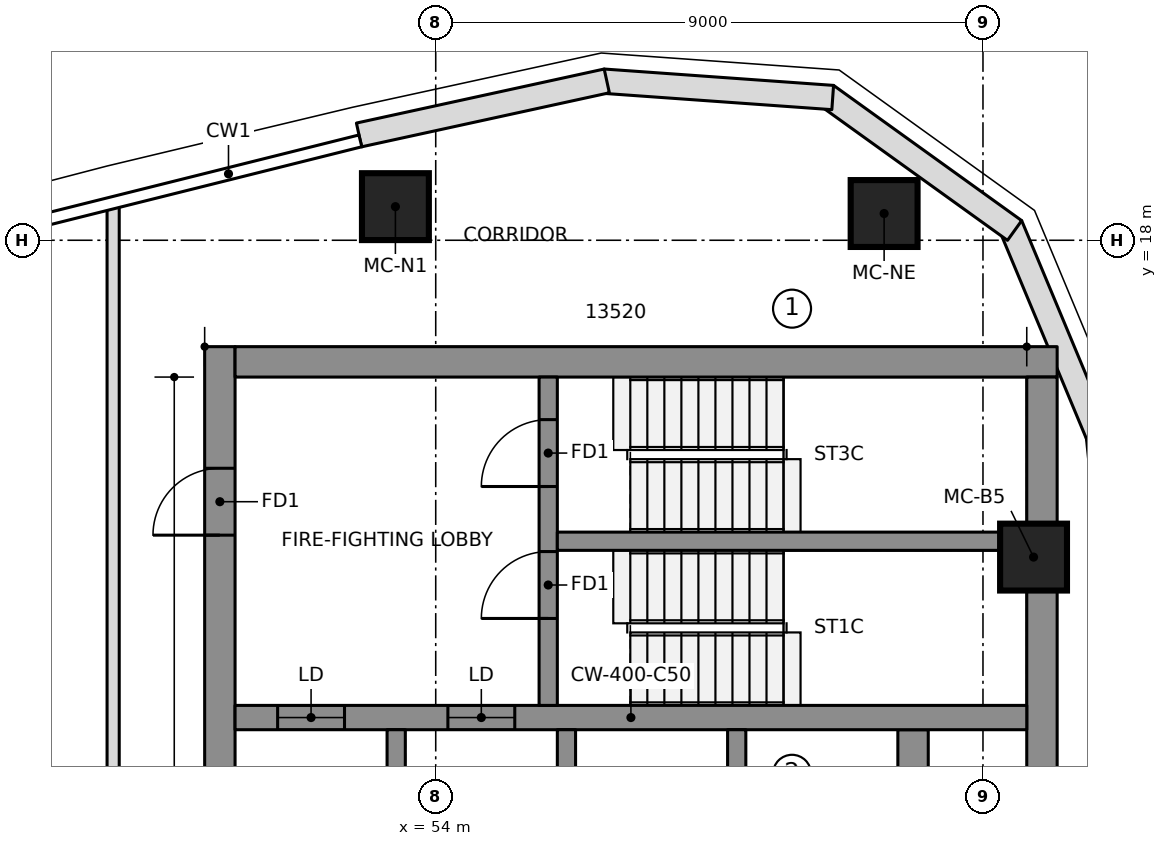
"""IFC4 building model, lengths in metres.
Left out: names, types, materials, properties, quantities, classifications, styles, units other than length and angle.
Written with IfcOpenShell. Run it as: python <this file> out.ifc"""

import sys

from ifc_helpers import new_model, si_unit, direction, frame, frame_2d, origin, origin_2d, place, context, subcontext, project, spatial, polyline, rectangle, outline, extrude, element, fill, save


model = new_model("IFC4")
c1 = context("Model", 3, precision=1e-05, world=origin(), true_north=direction((0.0, 1.0)))
c2 = subcontext(c1, "Body", "Model", "MODEL_VIEW")
j1 = project(units=[si_unit("LENGTHUNIT", "METRE"), si_unit("PLANEANGLEUNIT", "RADIAN")], contexts=[c1])
p1 = place(None, origin())
s1 = spatial("IfcSite", under=j1, at=p1, CompositionType="ELEMENT")
p2 = place(p1, origin())
s2 = spatial("IfcBuilding", under=s1, at=p2, CompositionType="ELEMENT")
p3 = place(p2, frame((0.0, 0.0, 299.85)))
s3 = spatial("IfcBuildingStorey", under=s2, at=p3, CompositionType="ELEMENT", Elevation=299.85)
p4 = place(p3, frame((50.45, 6.65, 0.0), z_axis=(0.0, 0.0, 1.0), x_axis=(0.0, 1.0, 0.0)))
e1 = element("IfcWall", 1, at=p4, inside=s3, PredefinedType="SHEAR", context=c2, shape_type="SweptSolid", body=[
    extrude(rectangle(XDim=9.6, YDim=0.5, at=frame_2d((4.8, 0.0))), origin(), (0.0, 0.0, 1.0), 3.55),
])
p5 = place(p4, frame((6.5, 0.0, 0.0)))
e2 = element("IfcOpeningElement", 2, at=p5, cuts=e1, PredefinedType="OPENING", context=c2, shape_type="SweptSolid", body=[
    extrude(rectangle(XDim=1.1, YDim=2.1, at=frame_2d((0.55, 1.05))), frame((0.0, 0.26, 0.0), z_axis=(0.0, -1.0, 0.0), x_axis=(1.0, 0.0, 0.0)), (0.0, 0.0, 1.0), 0.52),
])
p6 = place(p3, frame((50.7, 16.0, 0.0), z_axis=(0.0, 0.0, 1.0), x_axis=(1.0, 0.0, 0.0)))
e3 = element("IfcWall", 3, at=p6, inside=s3, PredefinedType="SHEAR", context=c2, shape_type="SweptSolid", body=[
    extrude(rectangle(XDim=13.52, YDim=0.5, at=frame_2d((6.76, 0.0))), origin(), (0.0, 0.0, 1.0), 3.55),
])
p7 = place(p3, frame((63.97, 6.903, 0.0), z_axis=(0.0, 0.0, 1.0), x_axis=(0.0, 1.0, 0.0)))
e4 = element("IfcWall", 4, at=p7, inside=s3, PredefinedType="SHEAR", context=c2, shape_type="SweptSolid", body=[
    extrude(rectangle(XDim=8.847, YDim=0.5, at=frame_2d((4.423, 0.0))), origin(), (0.0, 0.0, 1.0), 3.55),
])
p8 = place(p3, frame((61.85, -9.95, 0.0), z_axis=(0.0, 0.0, 1.0), x_axis=(0.0, 1.0, 0.0)))
e5 = element("IfcWall", 5, at=p8, inside=s3, PredefinedType="SHEAR", context=c2, shape_type="SweptSolid", body=[
    extrude(rectangle(XDim=19.9, YDim=0.5, at=frame_2d((9.95, 0.0))), origin(), (0.0, 0.0, 1.0), 3.55),
])
p9 = place(p3, frame((50.7, 10.15, 0.0), z_axis=(0.0, 0.0, 1.0), x_axis=(1.0, 0.0, 0.0)))
e6 = element("IfcWall", 6, at=p9, inside=s3, PredefinedType="SHEAR", context=c2, shape_type="SweptSolid", body=[
    extrude(rectangle(XDim=13.02, YDim=0.4, at=frame_2d((6.51, 0.0))), origin(), (0.0, 0.0, 1.0), 3.55),
])
p10 = place(p9, frame((0.7, 0.0, 0.0)))
e7 = element("IfcOpeningElement", 7, at=p10, cuts=e6, PredefinedType="OPENING", context=c2, shape_type="SweptSolid", body=[
    extrude(rectangle(XDim=1.1, YDim=2.1, at=frame_2d((0.55, 1.05))), frame((0.0, 0.21, 0.0), z_axis=(0.0, -1.0, 0.0), x_axis=(1.0, 0.0, 0.0)), (0.0, 0.0, 1.0), 0.42),
])
p11 = place(p9, frame((3.5, 0.0, 0.0)))
e8 = element("IfcOpeningElement", 8, at=p11, cuts=e6, PredefinedType="OPENING", context=c2, shape_type="SweptSolid", body=[
    extrude(rectangle(XDim=1.1, YDim=2.1, at=frame_2d((0.55, 1.05))), frame((0.0, 0.21, 0.0), z_axis=(0.0, -1.0, 0.0), x_axis=(1.0, 0.0, 0.0)), (0.0, 0.0, 1.0), 0.42),
])
for number, where, z_axis, x_axis in (
    (9, (53.35, 6.95, 0.0), (0.0, 0.0, 1.0), (0.0, 1.0, 0.0)),
    (10, (56.15, 6.95, 0.0), (0.0, 0.0, 1.0), (0.0, 1.0, 0.0)),
    (11, (58.95, 6.95, 0.0), (0.0, 0.0, 1.0), (0.0, 1.0, 0.0)),
):
    element("IfcWall", number, at=place(p3, frame(where, z_axis=z_axis, x_axis=x_axis)), inside=s3, PredefinedType="SHEAR", context=c2, shape_type="SweptSolid", body=[
        extrude(rectangle(XDim=3.0, YDim=0.3, at=frame_2d((1.5, 0.0))), origin(), (0.0, 0.0, 1.0), 3.55),
    ])
p12 = place(p3, frame((55.85, 10.35, 0.0), z_axis=(0.0, 0.0, 1.0), x_axis=(0.0, 1.0, 0.0)))
e12 = element("IfcWall", 12, at=p12, inside=s3, PredefinedType="SHEAR", context=c2, shape_type="SweptSolid", body=[
    extrude(rectangle(XDim=5.4, YDim=0.3, at=frame_2d((2.7, 0.0))), origin(), (0.0, 0.0, 1.0), 3.55),
])
p13 = place(p12, frame((1.43, 0.0, 0.0)))
e13 = element("IfcOpeningElement", 13, at=p13, cuts=e12, PredefinedType="OPENING", context=c2, shape_type="SweptSolid", body=[
    extrude(rectangle(XDim=1.1, YDim=2.1, at=frame_2d((0.55, 1.05))), frame((0.0, 0.16, 0.0), z_axis=(0.0, -1.0, 0.0), x_axis=(1.0, 0.0, 0.0)), (0.0, 0.0, 1.0), 0.32),
])
p14 = place(p12, frame((3.6, 0.0, 0.0)))
e14 = element("IfcOpeningElement", 14, at=p14, cuts=e12, PredefinedType="OPENING", context=c2, shape_type="SweptSolid", body=[
    extrude(rectangle(XDim=1.1, YDim=2.1, at=frame_2d((0.55, 1.05))), frame((0.0, 0.16, 0.0), z_axis=(0.0, -1.0, 0.0), x_axis=(1.0, 0.0, 0.0)), (0.0, 0.0, 1.0), 0.32),
])
p15 = place(p3, frame((56.0, 13.05, 0.0), z_axis=(0.0, 0.0, 1.0), x_axis=(1.0, 0.0, 0.0)))
e15 = element("IfcWall", 15, at=p15, inside=s3, PredefinedType="SHEAR", context=c2, shape_type="SweptSolid", body=[
    extrude(rectangle(XDim=7.72, YDim=0.3, at=frame_2d((3.86, 0.0))), origin(), (0.0, 0.0, 1.0), 3.55),
])
for number, where, z_axis, x_axis in (
    (16, (63.832, 12.789, 0.0), (0.0, 0.0, 1.0), (1.0, 0.0, 0.0)),
    (17, (61.374, 18.44, 0.0), (0.0, 0.0, 1.0), (1.0, 0.0, 0.0)),
    (18, (53.337, 18.553, 0.0), (0.0, 0.0, 1.0), (1.0, 0.0, 0.0)),
):
    element("IfcColumn", number, at=place(p3, frame(where, z_axis=z_axis, x_axis=x_axis)), inside=s3, PredefinedType="COLUMN", context=c2, shape_type="SweptSolid", body=[
        extrude(rectangle(XDim=1.1, YDim=1.1, at=origin_2d()), origin(), (0.0, 0.0, 1.0), 3.55),
    ])
p16 = place(p3, frame((65.331, 10.571, 0.0), z_axis=(0.0, 0.0, 1.0), x_axis=(-0.102249826987, 0.994758751096, 0.0)))
e19 = element("IfcWall", 19, at=p16, inside=s3, PredefinedType="NOTDEFINED", context=c2, shape_type="SweptSolid", body=[
    extrude(outline(polyline([(-0.003, -0.2), (4.263, -0.2), (4.204, 0.2), (0.003, 0.2), (-0.003, -0.2)])), origin(), (0.0, 0.0, 1.0), 3.25),
])
p17 = place(p3, frame((64.898, 14.782, 0.0), z_axis=(0.0, 0.0, 1.0), x_axis=(-0.385285857918, 0.922797273343, 0.0)))
e20 = element("IfcWall", 20, at=p17, inside=s3, PredefinedType="NOTDEFINED", context=c2, shape_type="SweptSolid", body=[
    extrude(outline(polyline([(-0.03, -0.2), (3.753, -0.2), (3.64, 0.2), (0.03, 0.2), (-0.03, -0.2)])), origin(), (0.0, 0.0, 1.0), 3.25),
])
p18 = place(p3, frame((63.474, 18.194, 0.0), z_axis=(0.0, 0.0, 1.0), x_axis=(-0.811962548682, 0.583709533533, 0.0)))
e21 = element("IfcWall", 21, at=p18, inside=s3, PredefinedType="NOTDEFINED", context=c2, shape_type="SweptSolid", body=[
    extrude(outline(polyline([(-0.057, -0.2), (3.753, -0.2), (3.64, 0.2), (0.057, 0.2), (-0.057, -0.2)])), origin(), (0.0, 0.0, 1.0), 3.25),
])
p19 = place(p3, frame((60.472, 20.352, 0.0), z_axis=(0.0, 0.0, 1.0), x_axis=(-0.99746272096, 0.071190731806, 0.0)))
e22 = element("IfcWall", 22, at=p19, inside=s3, PredefinedType="NOTDEFINED", context=c2, shape_type="SweptSolid", body=[
    extrude(outline(polyline([(-0.057, -0.2), (3.726, -0.2), (3.668, 0.2), (0.057, 0.2), (-0.057, -0.2)])), origin(), (0.0, 0.0, 1.0), 3.25),
])
p20 = place(p3, frame((56.785, 20.615, 0.0), z_axis=(0.0, 0.0, 1.0), x_axis=(-0.977020225348, -0.213146614471, 0.0)))
e23 = element("IfcWall", 23, at=p20, inside=s3, PredefinedType="NOTDEFINED", context=c2, shape_type="SweptSolid", body=[
    extrude(outline(polyline([(-0.029, -0.2), (4.142, -0.2), (4.142, 0.2), (0.029, 0.2), (-0.029, -0.2)])), origin(), (0.0, 0.0, 1.0), 3.25),
])
p21 = place(p3, frame((48.695, 18.553, 0.0), z_axis=(0.0, 0.0, 1.0), x_axis=(0.0, -1.0, 0.0)))
e24 = element("IfcWall", 24, at=p21, inside=s3, PredefinedType="PARTITIONING", context=c2, shape_type="SweptSolid", body=[
    extrude(rectangle(XDim=9.997, YDim=0.2, at=frame_2d((4.998, 0.0))), origin(), (0.0, 0.0, 1.0), 3.15),
])
p22 = place(p10, origin())
e25 = element("IfcDoor", 25, at=p22, inside=s3, OperationType="DOUBLE_DOOR_SLIDING", PredefinedType="DOOR", context=c2, shape_type="SweptSolid", body=[
    extrude(rectangle(XDim=1.1, YDim=2.1, at=frame_2d((0.55, 1.05))), frame((0.0, 0.025, 0.0), z_axis=(0.0, -1.0, 0.0), x_axis=(1.0, 0.0, 0.0)), (0.0, 0.0, 1.0), 0.05),
])
fill(e7, e25)
p23 = place(p11, origin())
e26 = element("IfcDoor", 26, at=p23, inside=s3, OperationType="DOUBLE_DOOR_SLIDING", PredefinedType="DOOR", context=c2, shape_type="SweptSolid", body=[
    extrude(rectangle(XDim=1.1, YDim=2.1, at=frame_2d((0.55, 1.05))), frame((0.0, 0.025, 0.0), z_axis=(0.0, -1.0, 0.0), x_axis=(1.0, 0.0, 0.0)), (0.0, 0.0, 1.0), 0.05),
])
fill(e8, e26)
p24 = place(p13, origin())
e27 = element("IfcDoor", 27, at=p24, inside=s3, OperationType="SINGLE_SWING_RIGHT", PredefinedType="DOOR", context=c2, shape_type="SweptSolid", body=[
    extrude(rectangle(XDim=1.1, YDim=2.1, at=frame_2d((0.55, 1.05))), frame((0.0, 0.025, 0.0), z_axis=(0.0, -1.0, 0.0), x_axis=(1.0, 0.0, 0.0)), (0.0, 0.0, 1.0), 0.05),
])
fill(e13, e27)
p25 = place(p14, origin())
e28 = element("IfcDoor", 28, at=p25, inside=s3, OperationType="SINGLE_SWING_RIGHT", PredefinedType="DOOR", context=c2, shape_type="SweptSolid", body=[
    extrude(rectangle(XDim=1.1, YDim=2.1, at=frame_2d((0.55, 1.05))), frame((0.0, 0.025, 0.0), z_axis=(0.0, -1.0, 0.0), x_axis=(1.0, 0.0, 0.0)), (0.0, 0.0, 1.0), 0.05),
])
fill(e14, e28)
p26 = place(p5, origin())
e29 = element("IfcDoor", 29, at=p26, inside=s3, OperationType="SINGLE_SWING_RIGHT", PredefinedType="DOOR", context=c2, shape_type="SweptSolid", body=[
    extrude(rectangle(XDim=1.1, YDim=2.1, at=frame_2d((0.55, 1.05))), frame((0.0, 0.025, 0.0), z_axis=(0.0, -1.0, 0.0), x_axis=(1.0, 0.0, 0.0)), (0.0, 0.0, 1.0), 0.05),
])
fill(e2, e29)
save(model, sys.argv[1])
